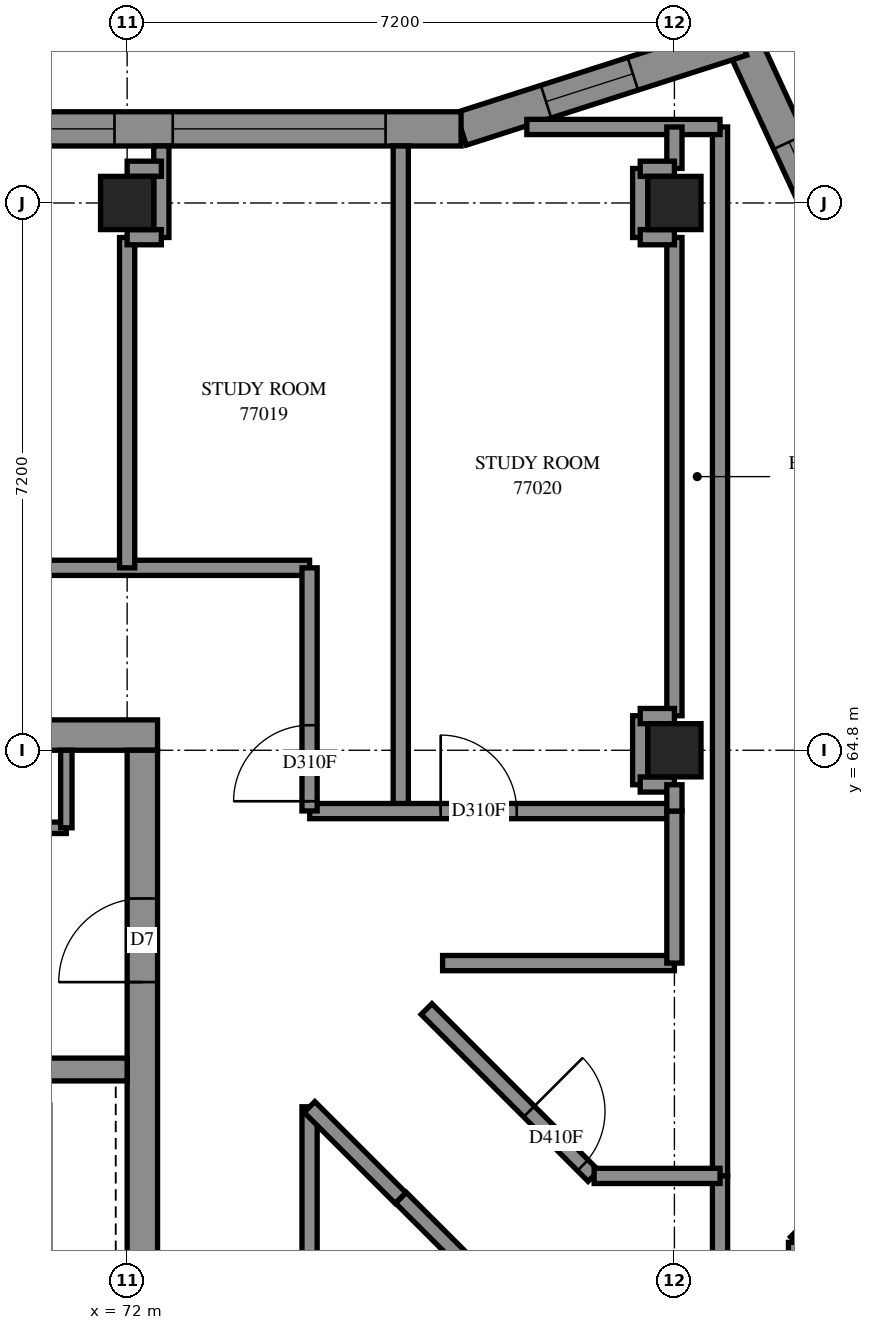
"""IFC4 building model, lengths in metres.
Left out: names, types, materials, properties, quantities, classifications, styles, units other than length and angle.
Written with IfcOpenShell. Run it as: python <this file> out.ifc"""

import sys

from ifc_helpers import new_model, si_unit, direction, frame, frame_2d, origin, origin_2d, place, context, subcontext, project, spatial, polyline, rectangle, outline, extrude, element, fill, save


model = new_model("IFC4")
c1 = context("Model", 3, precision=1e-05, world=origin(), true_north=direction((0.0, 1.0)))
c2 = subcontext(c1, "Body", "Model", "MODEL_VIEW")
j1 = project(units=[si_unit("LENGTHUNIT", "METRE"), si_unit("PLANEANGLEUNIT", "RADIAN")], contexts=[c1])
p1 = place(None, origin())
s1 = spatial("IfcSite", under=j1, at=p1, CompositionType="ELEMENT")
p2 = place(p1, origin())
s2 = spatial("IfcBuilding", under=s1, at=p2, CompositionType="ELEMENT")
p3 = place(p2, frame((0.0, 0.0, 281.2)))
s3 = spatial("IfcBuildingStorey", under=s2, at=p3, CompositionType="ELEMENT", Elevation=281.2)
for number, where, z_axis, x_axis in (
    (1, (72.0, 72.0, 0.0), (0.0, 0.0, 1.0), (1.0, 0.0, 0.0)),
    (2, (79.2, 64.8, 0.0), (0.0, 0.0, 1.0), (1.0, 0.0, 0.0)),
    (3, (79.2, 72.0, 0.0), (0.0, 0.0, 1.0), (1.0, 0.0, 0.0)),
):
    element("IfcColumn", number, at=place(p3, frame(where, z_axis=z_axis, x_axis=x_axis)), inside=s3, PredefinedType="COLUMN", context=c2, shape_type="SweptSolid", body=[
        extrude(rectangle(XDim=0.7, YDim=0.7, at=origin_2d()), origin(), (0.0, 0.0, 1.0), 3.1),
    ])
p4 = place(p3, frame((57.2, 65.0, -0.3), z_axis=(0.0, 0.0, 1.0), x_axis=(1.0, 0.0, 0.0)))
e4 = element("IfcWall", 4, at=p4, inside=s3, PredefinedType="SHEAR", context=c2, shape_type="SweptSolid", body=[
    extrude(rectangle(XDim=15.2, YDim=0.4, at=frame_2d((7.6, 0.0))), origin(), (0.0, 0.0, 1.0), 2.7),
])
p5 = place(p4, frame((10.4, 0.0, 0.3)))
e5 = element("IfcOpeningElement", 5, at=p5, cuts=e4, PredefinedType="OPENING", context=c2, shape_type="SweptSolid", body=[
    extrude(rectangle(XDim=0.8, YDim=2.1, at=frame_2d((0.4, 1.05))), frame((0.0, 0.21, 0.0), z_axis=(0.0, -1.0, 0.0), x_axis=(1.0, 0.0, 0.0)), (0.0, 0.0, 1.0), 0.42),
])
p6 = place(p3, frame((72.2, 50.4, -0.3), z_axis=(0.0, 0.0, 1.0), x_axis=(0.0, 1.0, 0.0)))
e6 = element("IfcWall", 6, at=p6, inside=s3, PredefinedType="SHEAR", context=c2, shape_type="SweptSolid", body=[
    extrude(rectangle(XDim=14.4, YDim=0.4, at=frame_2d((7.2, 0.0))), origin(), (0.0, 0.0, 1.0), 2.7),
])
p7 = place(p6, frame((4.55, 0.0, 0.3)))
e7 = element("IfcOpeningElement", 7, at=p7, cuts=e6, PredefinedType="OPENING", context=c2, shape_type="SweptSolid", body=[
    extrude(rectangle(XDim=1.1, YDim=2.1, at=frame_2d((0.55, 1.05))), frame((0.0, 0.21, 0.0), z_axis=(0.0, -1.0, 0.0), x_axis=(1.0, 0.0, 0.0)), (0.0, 0.0, 1.0), 0.42),
])
p8 = place(p6, frame((11.35, 0.0, 0.3)))
e8 = element("IfcOpeningElement", 8, at=p8, cuts=e6, PredefinedType="OPENING", context=c2, shape_type="SweptSolid", body=[
    extrude(rectangle(XDim=1.1, YDim=2.1, at=frame_2d((0.55, 1.05))), frame((0.0, 0.21, 0.0), z_axis=(0.0, -1.0, 0.0), x_axis=(1.0, 0.0, 0.0)), (0.0, 0.0, 1.0), 0.42),
])
p9 = place(p3, frame((64.8, 60.6, 0.0), z_axis=(0.0, 0.0, 1.0), x_axis=(1.0, 0.0, 0.0)))
e9 = element("IfcWall", 9, at=p9, inside=s3, PredefinedType="SOLIDWALL", context=c2, shape_type="SweptSolid", body=[
    extrude(rectangle(XDim=7.2, YDim=0.3, at=frame_2d((3.6, 0.0))), origin(), (0.0, 0.0, 1.0), 3.1),
])
p10 = place(p3, frame((76.513, 49.231, -0.3), z_axis=(0.0, 0.0, 1.0), x_axis=(0.7071067812, 0.7071067812, 0.0)))
e10 = element("IfcWall", 10, at=p10, inside=s3, PredefinedType="SHEAR", context=c2, shape_type="SweptSolid", body=[
    extrude(rectangle(XDim=14.4, YDim=0.4, at=frame_2d((7.2, 0.0))), origin(), (0.0, 0.0, 1.0), 2.7),
])
p11 = place(p10, frame((4.55, 0.0, 0.3)))
e11 = element("IfcOpeningElement", 11, at=p11, cuts=e10, PredefinedType="OPENING", context=c2, shape_type="SweptSolid", body=[
    extrude(rectangle(XDim=1.1, YDim=2.1, at=frame_2d((0.55, 1.05))), frame((0.0, 0.21, 0.0), z_axis=(0.0, -1.0, 0.0), x_axis=(1.0, 0.0, 0.0)), (0.0, 0.0, 1.0), 0.42),
])
p12 = place(p10, frame((11.35, 0.0, 0.3)))
e12 = element("IfcOpeningElement", 12, at=p12, cuts=e10, PredefinedType="OPENING", context=c2, shape_type="SweptSolid", body=[
    extrude(rectangle(XDim=1.1, YDim=2.1, at=frame_2d((0.55, 1.05))), frame((0.0, 0.21, 0.0), z_axis=(0.0, -1.0, 0.0), x_axis=(1.0, 0.0, 0.0)), (0.0, 0.0, 1.0), 0.42),
])
p13 = place(p3, frame((81.518, 71.05, 0.0), z_axis=(0.0, 0.0, 1.0), x_axis=(-0.4192600766, 0.907866173, 0.0)))
e13 = element("IfcWall", 13, at=p13, inside=s3, PredefinedType="SOLIDWALL", context=c2, shape_type="SweptSolid", body=[
    extrude(outline(polyline([(0.062, -0.225), (3.623, -0.225), (3.224, 0.225), (-0.062, 0.225), (0.062, -0.225)])), origin(), (0.0, 0.0, 1.0), 3.1),
])
p14 = place(p13, frame((0.731, 0.0, 0.45)))
e14 = element("IfcOpeningElement", 14, at=p14, cuts=e13, PredefinedType="OPENING", context=c2, shape_type="SweptSolid", body=[
    extrude(rectangle(XDim=1.2, YDim=2.55, at=frame_2d((0.6, 1.275))), frame((0.0, 0.235, 0.0), z_axis=(0.0, -1.0, 0.0), x_axis=(1.0, 0.0, 0.0)), (0.0, 0.0, 1.0), 0.47),
])
p15 = place(p3, frame((80.083, 74.158, 0.0), z_axis=(0.0, 0.0, 1.0), x_axis=(-0.9522471777, -0.3053282047, 0.0)))
e15 = element("IfcWall", 15, at=p15, inside=s3, PredefinedType="SOLIDWALL", context=c2, shape_type="SweptSolid", body=[
    extrude(outline(polyline([(-0.199, -0.225), (3.839, -0.225), (3.91, 0.225), (0.199, 0.225), (-0.199, -0.225)])), origin(), (0.0, 0.0, 1.0), 3.1),
])
p16 = place(p15, frame((1.501, 0.0, 0.45)))
e16 = element("IfcOpeningElement", 16, at=p16, cuts=e15, PredefinedType="OPENING", context=c2, shape_type="SweptSolid", body=[
    extrude(rectangle(XDim=1.2, YDim=2.55, at=frame_2d((0.6, 1.275))), frame((0.0, 0.235, 0.0), z_axis=(0.0, -1.0, 0.0), x_axis=(1.0, 0.0, 0.0)), (0.0, 0.0, 1.0), 0.47),
])
p17 = place(p3, frame((76.393, 72.975, 0.0), z_axis=(0.0, 0.0, 1.0), x_axis=(-1.0, 0.0, 0.0)))
e17 = element("IfcWall", 17, at=p17, inside=s3, PredefinedType="SOLIDWALL", context=c2, shape_type="SweptSolid", body=[
    extrude(outline(polyline([(0.035, -0.225), (7.726, -0.225), (7.726, 0.225), (-0.035, 0.225), (0.035, -0.225)])), origin(), (0.0, 0.0, 1.0), 3.1),
])
p18 = place(p17, frame((0.993, 0.0, 0.45)))
e18 = element("IfcOpeningElement", 18, at=p18, cuts=e17, PredefinedType="OPENING", context=c2, shape_type="SweptSolid", body=[
    extrude(rectangle(XDim=2.8, YDim=2.55, at=frame_2d((1.4, 1.275))), frame((0.0, 0.235, 0.0), z_axis=(0.0, -1.0, 0.0), x_axis=(1.0, 0.0, 0.0)), (0.0, 0.0, 1.0), 0.47),
])
p19 = place(p17, frame((4.56, 0.0, 0.45)))
e19 = element("IfcOpeningElement", 19, at=p19, cuts=e17, PredefinedType="OPENING", context=c2, shape_type="SweptSolid", body=[
    extrude(rectangle(XDim=2.8, YDim=2.55, at=frame_2d((1.4, 1.275))), frame((0.0, 0.235, 0.0), z_axis=(0.0, -1.0, 0.0), x_axis=(1.0, 0.0, 0.0)), (0.0, 0.0, 1.0), 0.47),
])
p20 = place(p3, frame((64.95, 63.78, 0.0), z_axis=(0.0, 0.0, 1.0), x_axis=(1.0, 0.0, 0.0)))
e20 = element("IfcWall", 20, at=p20, inside=s3, PredefinedType="PARTITIONING", context=c2, shape_type="SweptSolid", body=[
    extrude(rectangle(XDim=6.25, YDim=0.15, at=frame_2d((3.125, 0.0))), origin(), (0.0, 0.0, 1.0), 3.1),
])
p21 = place(p3, frame((71.2, 63.78, 0.0), z_axis=(0.0, 0.0, 1.0), x_axis=(0.0, 1.0, 0.0)))
e21 = element("IfcWall", 21, at=p21, inside=s3, PredefinedType="PARTITIONING", context=c2, shape_type="SweptSolid", body=[
    extrude(rectangle(XDim=1.02, YDim=0.15, at=frame_2d((0.51, 0.0))), origin(), (0.0, 0.0, 1.0), 3.1),
])
p22 = place(p3, frame((55.2, 67.2, 0.0), z_axis=(0.0, 0.0, 1.0), x_axis=(1.0, 0.0, 0.0)))
e22 = element("IfcWall", 22, at=p22, inside=s3, PredefinedType="PARTITIONING", context=c2, shape_type="SweptSolid", body=[
    extrude(rectangle(XDim=19.2, YDim=0.2, at=frame_2d((9.6, 0.0))), origin(), (0.0, 0.0, 1.0), 3.1),
])
p23 = place(p22, frame((6.299, 0.0, 0.0)))
e23 = element("IfcOpeningElement", 23, at=p23, cuts=e22, PredefinedType="OPENING", context=c2, shape_type="SweptSolid", body=[
    extrude(rectangle(XDim=0.9, YDim=2.1, at=frame_2d((0.45, 1.05))), frame((0.0, 0.11, 0.0), z_axis=(0.0, -1.0, 0.0), x_axis=(1.0, 0.0, 0.0)), (0.0, 0.0, 1.0), 0.22),
])
p24 = place(p22, frame((13.65, 0.0, 0.0)))
e24 = element("IfcOpeningElement", 24, at=p24, cuts=e22, PredefinedType="OPENING", context=c2, shape_type="SweptSolid", body=[
    extrude(rectangle(XDim=0.9, YDim=2.1, at=frame_2d((0.45, 1.05))), frame((0.0, 0.11, 0.0), z_axis=(0.0, -1.0, 0.0), x_axis=(1.0, 0.0, 0.0)), (0.0, 0.0, 1.0), 0.22),
])
p25 = place(p3, frame((79.8, 59.2, 0.0), z_axis=(0.0, 0.0, 1.0), x_axis=(0.0, 1.0, 0.0)))
e25 = element("IfcWall", 25, at=p25, inside=s3, PredefinedType="PARTITIONING", context=c2, shape_type="SweptSolid", body=[
    extrude(rectangle(XDim=13.8, YDim=0.2, at=frame_2d((6.9, 0.0))), origin(), (0.0, 0.0, 1.0), 3.1),
])
p26 = place(p3, frame((80.799, 58.327, 0.0), z_axis=(0.0, 0.0, 1.0), x_axis=(0.7071121647, 0.7071013977, 0.0)))
e26 = element("IfcWall", 26, at=p26, inside=s3, PredefinedType="PARTITIONING", context=c2, shape_type="SweptSolid", body=[
    extrude(rectangle(XDim=9.288, YDim=0.2, at=frame_2d((4.644, 0.0))), origin(), (0.0, 0.0, 1.0), 3.1),
])
p27 = place(p3, frame((75.6, 64.0, 0.0), z_axis=(0.0, 0.0, 1.0), x_axis=(0.0, 1.0, 0.0)))
e27 = element("IfcWall", 27, at=p27, inside=s3, PredefinedType="PARTITIONING", context=c2, shape_type="SweptSolid", body=[
    extrude(rectangle(XDim=8.75, YDim=0.2, at=frame_2d((4.375, 0.0))), origin(), (0.0, 0.0, 1.0), 3.1),
])
p28 = place(p3, frame((80.802, 56.633, 0.0), z_axis=(0.0, 0.0, 1.0), x_axis=(0.7071067812, 0.7071067812, 0.0)))
e28 = element("IfcWall", 28, at=p28, inside=s3, PredefinedType="PARTITIONING", context=c2, shape_type="SweptSolid", body=[
    extrude(rectangle(XDim=8.533, YDim=0.2, at=frame_2d((4.267, 0.0))), origin(), (0.0, 0.0, 1.0), 3.1),
])
p29 = place(p28, frame((0.853, 0.0, 0.0)))
e29 = element("IfcOpeningElement", 29, at=p29, cuts=e28, PredefinedType="OPENING", context=c2, shape_type="SweptSolid", body=[
    extrude(rectangle(XDim=1.0, YDim=2.1, at=frame_2d((0.5, 1.05))), frame((0.0, 0.11, 0.0), z_axis=(0.0, -1.0, 0.0), x_axis=(1.0, 0.0, 0.0)), (0.0, 0.0, 1.0), 0.22),
])
p30 = place(p3, frame((74.4, 53.202, 0.0), z_axis=(0.0, 0.0, 1.0), x_axis=(0.0, 1.0, 0.0)))
e30 = element("IfcWall", 30, at=p30, inside=s3, PredefinedType="PARTITIONING", context=c2, shape_type="SweptSolid", body=[
    extrude(rectangle(XDim=6.908, YDim=0.2, at=frame_2d((3.454, 0.0))), origin(), (0.0, 0.0, 1.0), 3.1),
])
p31 = place(p3, frame((79.2, 65.254, 0.0), z_axis=(0.0, 0.0, 1.0), x_axis=(0.0, 1.0, 0.0)))
e31 = element("IfcWall", 31, at=p31, inside=s3, PredefinedType="PARTITIONING", context=c2, shape_type="SweptSolid", body=[
    extrude(rectangle(XDim=6.292, YDim=0.2, at=frame_2d((3.146, 0.0))), origin(), (0.0, 0.0, 1.0), 3.1),
])
p32 = place(p3, frame((74.402, 64.0, 0.0), z_axis=(0.0, 0.0, 1.0), x_axis=(1.0, 0.0, 0.0)))
e32 = element("IfcWall", 32, at=p32, inside=s3, PredefinedType="PARTITIONING", context=c2, shape_type="SweptSolid", body=[
    extrude(rectangle(XDim=4.798, YDim=0.2, at=frame_2d((2.399, 0.0))), origin(), (0.0, 0.0, 1.0), 3.1),
])
p33 = place(p32, frame((1.723, 0.0, 0.0)))
e33 = element("IfcOpeningElement", 33, at=p33, cuts=e32, PredefinedType="OPENING", context=c2, shape_type="SweptSolid", body=[
    extrude(rectangle(XDim=1.0, YDim=2.1, at=frame_2d((0.5, 1.05))), frame((0.0, 0.11, 0.0), z_axis=(0.0, -1.0, 0.0), x_axis=(1.0, 0.0, 0.0)), (0.0, 0.0, 1.0), 0.22),
])
p34 = place(p3, frame((72.0, 67.2, 0.0), z_axis=(0.0, 0.0, 1.0), x_axis=(0.0, 1.0, 0.0)))
e34 = element("IfcWall", 34, at=p34, inside=s3, PredefinedType="PARTITIONING", context=c2, shape_type="SweptSolid", body=[
    extrude(rectangle(XDim=4.346, YDim=0.2, at=frame_2d((2.173, 0.0))), origin(), (0.0, 0.0, 1.0), 3.1),
])
p35 = place(p3, frame((79.8, 55.914, 0.0), z_axis=(0.0, 0.0, 1.0), x_axis=(0.0, 1.0, 0.0)))
e35 = element("IfcWall", 35, at=p35, inside=s3, PredefinedType="PARTITIONING", context=c2, shape_type="SweptSolid", body=[
    extrude(rectangle(XDim=3.286, YDim=0.2, at=frame_2d((1.643, 0.0))), origin(), (0.0, 0.0, 1.0), 3.1),
])
p36 = place(p3, frame((74.4, 64.002, 0.0), z_axis=(0.0, 0.0, 1.0), x_axis=(0.0, 1.0, 0.0)))
e36 = element("IfcWall", 36, at=p36, inside=s3, PredefinedType="PARTITIONING", context=c2, shape_type="SweptSolid", body=[
    extrude(rectangle(XDim=3.198, YDim=0.2, at=frame_2d((1.599, 0.0))), origin(), (0.0, 0.0, 1.0), 3.1),
])
p37 = place(p36, frame((0.127, 0.0, 0.0)))
e37 = element("IfcOpeningElement", 37, at=p37, cuts=e36, PredefinedType="OPENING", context=c2, shape_type="SweptSolid", body=[
    extrude(rectangle(XDim=1.0, YDim=2.1, at=frame_2d((0.5, 1.05))), frame((0.0, 0.11, 0.0), z_axis=(0.0, -1.0, 0.0), x_axis=(1.0, 0.0, 0.0)), (0.0, 0.0, 1.0), 0.22),
])
p38 = place(p3, frame((75.939, 61.395, 0.0), z_axis=(0.0, 0.0, 1.0), x_axis=(0.7071067812, -0.7071067812, 0.0)))
e38 = element("IfcWall", 38, at=p38, inside=s3, PredefinedType="PARTITIONING", context=c2, shape_type="SweptSolid", body=[
    extrude(rectangle(XDim=3.106, YDim=0.2, at=frame_2d((1.553, 0.0))), origin(), (0.0, 0.0, 1.0), 3.1),
])
p39 = place(p38, frame((1.906, 0.0, 0.0)))
e39 = element("IfcOpeningElement", 39, at=p39, cuts=e38, PredefinedType="OPENING", context=c2, shape_type="SweptSolid", body=[
    extrude(rectangle(XDim=1.0, YDim=2.1, at=frame_2d((0.5, 1.05))), frame((0.0, 0.11, 0.0), z_axis=(0.0, -1.0, 0.0), x_axis=(1.0, 0.0, 0.0)), (0.0, 0.0, 1.0), 0.22),
])
p40 = place(p3, frame((76.15, 62.0, 0.0), z_axis=(0.0, 0.0, 1.0), x_axis=(1.0, 0.0, 0.0)))
e40 = element("IfcWall", 40, at=p40, inside=s3, PredefinedType="PARTITIONING", context=c2, shape_type="SweptSolid", body=[
    extrude(rectangle(XDim=3.05, YDim=0.2, at=frame_2d((1.525, 0.0))), origin(), (0.0, 0.0, 1.0), 3.1),
])
p41 = place(p3, frame((75.601, 58.913, 0.0), z_axis=(0.0, 0.0, 1.0), x_axis=(0.707460777, -0.7067526081, 0.0)))
e41 = element("IfcWall", 41, at=p41, inside=s3, PredefinedType="PARTITIONING", context=c2, shape_type="SweptSolid", body=[
    extrude(rectangle(XDim=2.824, YDim=0.2, at=frame_2d((1.412, 0.0))), origin(), (0.0, 0.0, 1.0), 3.1),
])
p42 = place(p3, frame((77.258, 73.0, 0.0), z_axis=(0.0, 0.0, 1.0), x_axis=(1.0, 0.0, 0.0)))
e42 = element("IfcWall", 42, at=p42, inside=s3, PredefinedType="PARTITIONING", context=c2, shape_type="SweptSolid", body=[
    extrude(rectangle(XDim=2.542, YDim=0.2, at=frame_2d((1.271, 0.0))), origin(), (0.0, 0.0, 1.0), 3.1),
])
p43 = place(p3, frame((79.2, 62.0, 0.0), z_axis=(0.0, 0.0, 1.0), x_axis=(0.0, 1.0, 0.0)))
e43 = element("IfcWall", 43, at=p43, inside=s3, PredefinedType="PARTITIONING", context=c2, shape_type="SweptSolid", body=[
    extrude(rectangle(XDim=2.0, YDim=0.2, at=frame_2d((1.0, 0.0))), origin(), (0.0, 0.0, 1.0), 3.1),
])
p44 = place(p3, frame((74.399, 60.107, 0.0), z_axis=(0.0, 0.0, 1.0), x_axis=(0.7071067812, -0.7071067812, 0.0)))
e44 = element("IfcWall", 44, at=p44, inside=s3, PredefinedType="PARTITIONING", context=c2, shape_type="SweptSolid", body=[
    extrude(rectangle(XDim=1.694, YDim=0.2, at=frame_2d((0.847, 0.0))), origin(), (0.0, 0.0, 1.0), 3.1),
])
p45 = place(p3, frame((78.144, 59.2, 0.0), z_axis=(0.0, 0.0, 1.0), x_axis=(1.0, 0.0, 0.0)))
e45 = element("IfcWall", 45, at=p45, inside=s3, PredefinedType="PARTITIONING", context=c2, shape_type="SweptSolid", body=[
    extrude(rectangle(XDim=1.656, YDim=0.2, at=frame_2d((0.828, 0.0))), origin(), (0.0, 0.0, 1.0), 3.1),
])
p46 = place(p3, frame((80.8, 56.912, 0.0), z_axis=(0.0, 0.0, 1.0), x_axis=(0.0, 1.0, 0.0)))
e46 = element("IfcWall", 46, at=p46, inside=s3, PredefinedType="PARTITIONING", context=c2, shape_type="SweptSolid", body=[
    extrude(rectangle(XDim=1.414, YDim=0.2, at=frame_2d((0.707, 0.0))), origin(), (0.0, 0.0, 1.0), 3.1),
])
p47 = place(p3, frame((78.75, 64.346, 0.0), z_axis=(0.0, 0.0, 1.0), x_axis=(0.0, 1.0, 0.0)))
e47 = element("IfcWall", 47, at=p47, inside=s3, PredefinedType="PARTITIONING", context=c2, shape_type="SweptSolid", body=[
    extrude(rectangle(XDim=0.908, YDim=0.2, at=frame_2d((0.454, 0.0))), origin(), (0.0, 0.0, 1.0), 3.1),
])
p48 = place(p3, frame((72.45, 71.546, 0.0), z_axis=(0.0, 0.0, 1.0), x_axis=(0.0, 1.0, 0.0)))
e48 = element("IfcWall", 48, at=p48, inside=s3, PredefinedType="PARTITIONING", context=c2, shape_type="SweptSolid", body=[
    extrude(rectangle(XDim=1.204, YDim=0.2, at=frame_2d((0.602, 0.0))), origin(), (0.0, 0.0, 1.0), 3.1),
])
p49 = place(p3, frame((78.75, 71.546, 0.0), z_axis=(0.0, 0.0, 1.0), x_axis=(0.0, 1.0, 0.0)))
e49 = element("IfcWall", 49, at=p49, inside=s3, PredefinedType="PARTITIONING", context=c2, shape_type="SweptSolid", body=[
    extrude(rectangle(XDim=0.908, YDim=0.2, at=frame_2d((0.454, 0.0))), origin(), (0.0, 0.0, 1.0), 3.1),
])
p50 = place(p3, frame((79.2, 72.454, 0.0), z_axis=(0.0, 0.0, 1.0), x_axis=(0.0, 1.0, 0.0)))
e50 = element("IfcWall", 50, at=p50, inside=s3, PredefinedType="PARTITIONING", context=c2, shape_type="SweptSolid", body=[
    extrude(rectangle(XDim=0.546, YDim=0.2, at=frame_2d((0.273, 0.0))), origin(), (0.0, 0.0, 1.0), 3.1),
])
for number, where, z_axis, x_axis in (
    (51, (72.0, 71.55, 0.0), (0.0, 0.0, 1.0), (1.0, 0.0, 0.0)),
    (52, (78.75, 71.55, 0.0), (0.0, 0.0, 1.0), (1.0, 0.0, 0.0)),
    (53, (72.0, 72.45, 0.0), (0.0, 0.0, 1.0), (1.0, 0.0, 0.0)),
    (54, (78.75, 72.45, 0.0), (0.0, 0.0, 1.0), (1.0, 0.0, 0.0)),
    (55, (78.75, 65.25, 0.0), (0.0, 0.0, 1.0), (1.0, 0.0, 0.0)),
    (56, (78.75, 64.35, 0.0), (0.0, 0.0, 1.0), (1.0, 0.0, 0.0)),
):
    element("IfcWall", number, at=place(p3, frame(where, z_axis=z_axis, x_axis=x_axis)), inside=s3, PredefinedType="PARTITIONING", context=c2, shape_type="SweptSolid", body=[
        extrude(rectangle(XDim=0.45, YDim=0.2, at=frame_2d((0.225, 0.0))), origin(), (0.0, 0.0, 1.0), 3.1),
    ])
p51 = place(p3, frame((79.2, 64.0, 0.0), z_axis=(0.0, 0.0, 1.0), x_axis=(0.0, 1.0, 0.0)))
e57 = element("IfcWall", 57, at=p51, inside=s3, PredefinedType="PARTITIONING", context=c2, shape_type="SweptSolid", body=[
    extrude(rectangle(XDim=0.346, YDim=0.2, at=frame_2d((0.173, 0.0))), origin(), (0.0, 0.0, 1.0), 3.1),
])
p52 = place(p14, origin())
e58 = element("IfcWindow", 58, at=p52, inside=s3, PartitioningType="SINGLE_PANEL", PredefinedType="WINDOW", context=c2, shape_type="SweptSolid", body=[
    extrude(rectangle(XDim=1.2, YDim=2.55, at=frame_2d((0.6, 1.275))), frame((0.0, 0.205, 0.0), z_axis=(0.0, -1.0, 0.0), x_axis=(1.0, 0.0, 0.0)), (0.0, 0.0, 1.0), 0.06),
])
fill(e14, e58)
p53 = place(p16, origin())
e59 = element("IfcWindow", 59, at=p53, inside=s3, PartitioningType="SINGLE_PANEL", PredefinedType="WINDOW", context=c2, shape_type="SweptSolid", body=[
    extrude(rectangle(XDim=1.2, YDim=2.55, at=frame_2d((0.6, 1.275))), frame((0.0, 0.205, 0.0), z_axis=(0.0, -1.0, 0.0), x_axis=(1.0, 0.0, 0.0)), (0.0, 0.0, 1.0), 0.06),
])
fill(e16, e59)
p54 = place(p18, origin())
e60 = element("IfcWindow", 60, at=p54, inside=s3, PartitioningType="SINGLE_PANEL", PredefinedType="WINDOW", context=c2, shape_type="SweptSolid", body=[
    extrude(rectangle(XDim=2.8, YDim=2.55, at=frame_2d((1.4, 1.275))), frame((0.0, 0.205, 0.0), z_axis=(0.0, -1.0, 0.0), x_axis=(1.0, 0.0, 0.0)), (0.0, 0.0, 1.0), 0.06),
])
fill(e18, e60)
p55 = place(p19, origin())
e61 = element("IfcWindow", 61, at=p55, inside=s3, PartitioningType="SINGLE_PANEL", PredefinedType="WINDOW", context=c2, shape_type="SweptSolid", body=[
    extrude(rectangle(XDim=2.8, YDim=2.55, at=frame_2d((1.4, 1.275))), frame((0.0, 0.205, 0.0), z_axis=(0.0, -1.0, 0.0), x_axis=(1.0, 0.0, 0.0)), (0.0, 0.0, 1.0), 0.06),
])
fill(e19, e61)
p56 = place(p8, origin())
e62 = element("IfcDoor", 62, at=p56, inside=s3, OperationType="SINGLE_SWING_RIGHT", PredefinedType="DOOR", context=c2, shape_type="SweptSolid", body=[
    extrude(rectangle(XDim=1.1, YDim=2.1, at=frame_2d((0.55, 1.05))), frame((0.0, 0.025, 0.0), z_axis=(0.0, -1.0, 0.0), x_axis=(1.0, 0.0, 0.0)), (0.0, 0.0, 1.0), 0.05),
])
fill(e8, e62)
p57 = place(p37, origin())
e63 = element("IfcDoor", 63, at=p57, inside=s3, OperationType="SINGLE_SWING_RIGHT", PredefinedType="DOOR", context=c2, shape_type="SweptSolid", body=[
    extrude(rectangle(XDim=1.0, YDim=2.1, at=frame_2d((0.5, 1.05))), frame((0.0, 0.025, 0.0), z_axis=(0.0, -1.0, 0.0), x_axis=(1.0, 0.0, 0.0)), (0.0, 0.0, 1.0), 0.05),
])
fill(e37, e63)
p58 = place(p33, origin())
e64 = element("IfcDoor", 64, at=p58, inside=s3, OperationType="SINGLE_SWING_LEFT", PredefinedType="DOOR", context=c2, shape_type="SweptSolid", body=[
    extrude(rectangle(XDim=1.0, YDim=2.1, at=frame_2d((0.5, 1.05))), frame((0.0, 0.025, 0.0), z_axis=(0.0, -1.0, 0.0), x_axis=(1.0, 0.0, 0.0)), (0.0, 0.0, 1.0), 0.05),
])
fill(e33, e64)
p59 = place(p39, origin())
e65 = element("IfcDoor", 65, at=p59, inside=s3, OperationType="SINGLE_SWING_LEFT", PredefinedType="DOOR", context=c2, shape_type="SweptSolid", body=[
    extrude(rectangle(XDim=1.0, YDim=2.1, at=frame_2d((0.5, 1.05))), frame((0.0, 0.025, 0.0), z_axis=(0.0, -1.0, 0.0), x_axis=(1.0, 0.0, 0.0)), (0.0, 0.0, 1.0), 0.05),
])
fill(e39, e65)
save(model, sys.argv[1])
